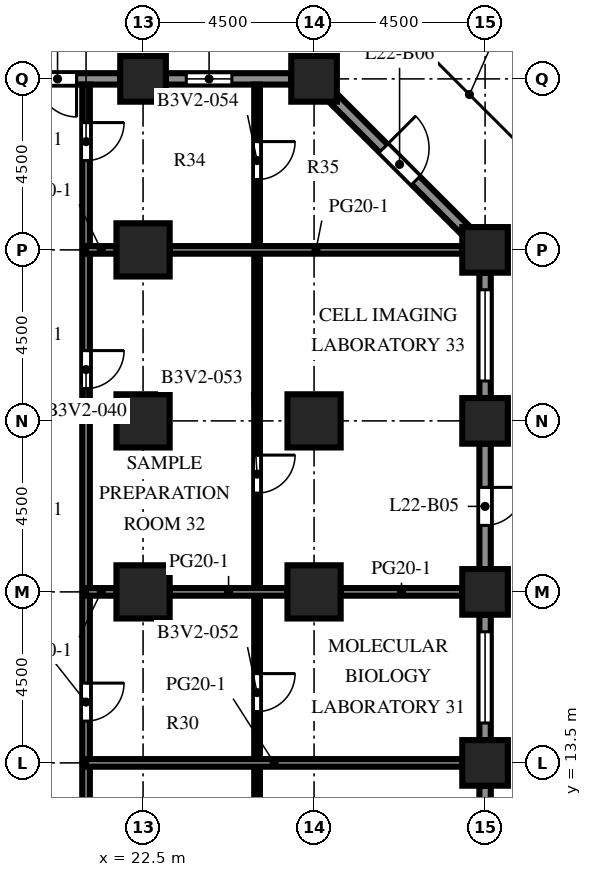
"""IFC4 building model, lengths in metres.
Left out: names, types, materials, properties, quantities, classifications, styles, units other than length and angle.
Written with IfcOpenShell. Run it as: python <this file> out.ifc"""

import sys

from ifc_helpers import new_model, si_unit, direction, frame, frame_2d, origin, origin_2d, place, context, subcontext, project, spatial, rectangle, extrude, element, fill, save


model = new_model("IFC4")
c1 = context("Model", 3, precision=1e-05, world=origin(), true_north=direction((0.0, 1.0)))
c2 = subcontext(c1, "Body", "Model", "MODEL_VIEW")
j1 = project(units=[si_unit("LENGTHUNIT", "METRE"), si_unit("PLANEANGLEUNIT", "RADIAN")], contexts=[c1])
p1 = place(None, origin())
s1 = spatial("IfcSite", under=j1, at=p1, CompositionType="ELEMENT")
p2 = place(p1, origin())
s2 = spatial("IfcBuilding", under=s1, at=p2, CompositionType="ELEMENT")
p3 = place(p2, frame((0.0, 0.0, 98.4)))
s3 = spatial("IfcBuildingStorey", under=s2, at=p3, CompositionType="ELEMENT", Elevation=98.4)
for number, where, z_axis, x_axis in (
    (1, (22.5, 31.5, 0.0), (0.0, 0.0, 1.0), (1.0, 0.0, 0.0)),
    (2, (27.0, 31.5, 0.0), (0.0, 0.0, 1.0), (1.0, 0.0, 0.0)),
    (3, (31.5, 13.5, 0.0), (0.0, 0.0, 1.0), (1.0, 0.0, 0.0)),
    (4, (31.5, 18.0, 0.0), (0.0, 0.0, 1.0), (1.0, 0.0, 0.0)),
    (5, (31.5, 22.5, 0.0), (0.0, 0.0, 1.0), (1.0, 0.0, 0.0)),
    (6, (31.5, 27.0, 0.0), (0.0, 0.0, 1.0), (1.0, 0.0, 0.0)),
):
    element("IfcColumn", number, at=place(p3, frame(where, z_axis=z_axis, x_axis=x_axis)), inside=s3, PredefinedType="COLUMN", context=c2, shape_type="SweptSolid", body=[
        extrude(rectangle(XDim=1.2, YDim=1.2, at=origin_2d()), origin(), (0.0, 0.0, 1.0), 4.1),
    ])
for number, where, z_axis, x_axis in (
    (7, (22.5, 18.0, 0.0), (0.0, 0.0, 1.0), (1.0, 0.0, 0.0)),
    (8, (22.5, 22.5, 0.0), (0.0, 0.0, 1.0), (1.0, 0.0, 0.0)),
    (9, (22.5, 27.0, 0.0), (0.0, 0.0, 1.0), (1.0, 0.0, 0.0)),
    (10, (27.0, 18.0, 0.0), (0.0, 0.0, 1.0), (1.0, 0.0, 0.0)),
    (11, (27.0, 22.5, 0.0), (0.0, 0.0, 1.0), (1.0, 0.0, 0.0)),
):
    element("IfcColumn", number, at=place(p3, frame(where, z_axis=z_axis, x_axis=x_axis)), inside=s3, PredefinedType="COLUMN", context=c2, shape_type="SweptSolid", body=[
        extrude(rectangle(XDim=1.4, YDim=1.4, at=origin_2d()), origin(), (0.0, 0.0, 1.0), 4.1),
    ])
p4 = place(p3, frame((31.5, 12.9, 0.0), z_axis=(0.0, 0.0, 1.0), x_axis=(0.0, -1.0, 0.0)))
e12 = element("IfcWall", 12, at=p4, inside=s3, PredefinedType="SOLIDWALL", context=c2, shape_type="SweptSolid", body=[
    extrude(rectangle(XDim=3.3, YDim=0.3, at=frame_2d((1.65, 0.0))), origin(), (0.0, 0.0, 1.0), 2.75),
])
p5 = place(p4, frame((0.45, 0.0, 0.8)))
e13 = element("IfcOpeningElement", 13, at=p5, cuts=e12, PredefinedType="OPENING", context=c2, shape_type="SweptSolid", body=[
    extrude(rectangle(XDim=2.4, YDim=1.7, at=frame_2d((1.2, 0.85))), frame((0.0, 0.16, 0.0), z_axis=(0.0, -1.0, 0.0), x_axis=(1.0, 0.0, 0.0)), (0.0, 0.0, 1.0), 0.32),
])
p6 = place(p3, frame((31.5, 17.4, 0.0), z_axis=(0.0, 0.0, 1.0), x_axis=(0.0, -1.0, 0.0)))
e14 = element("IfcWall", 14, at=p6, inside=s3, PredefinedType="SOLIDWALL", context=c2, shape_type="SweptSolid", body=[
    extrude(rectangle(XDim=3.3, YDim=0.3, at=frame_2d((1.65, 0.0))), origin(), (0.0, 0.0, 1.0), 2.75),
])
p7 = place(p6, frame((0.45, 0.0, 0.8)))
e15 = element("IfcOpeningElement", 15, at=p7, cuts=e14, PredefinedType="OPENING", context=c2, shape_type="SweptSolid", body=[
    extrude(rectangle(XDim=2.4, YDim=1.7, at=frame_2d((1.2, 0.85))), frame((0.0, 0.16, 0.0), z_axis=(0.0, -1.0, 0.0), x_axis=(1.0, 0.0, 0.0)), (0.0, 0.0, 1.0), 0.32),
])
p8 = place(p3, frame((31.5, 21.9, 0.0), z_axis=(0.0, 0.0, 1.0), x_axis=(0.0, -1.0, 0.0)))
e16 = element("IfcWall", 16, at=p8, inside=s3, PredefinedType="SOLIDWALL", context=c2, shape_type="SweptSolid", body=[
    extrude(rectangle(XDim=3.3, YDim=0.3, at=frame_2d((1.65, 0.0))), origin(), (0.0, 0.0, 1.0), 2.75),
])
p9 = place(p8, frame((1.15, 0.0, 0.0)))
e17 = element("IfcOpeningElement", 17, at=p9, cuts=e16, PredefinedType="OPENING", context=c2, shape_type="SweptSolid", body=[
    extrude(rectangle(XDim=1.0, YDim=2.2, at=frame_2d((0.5, 1.1))), frame((0.0, 0.16, 0.0), z_axis=(0.0, -1.0, 0.0), x_axis=(1.0, 0.0, 0.0)), (0.0, 0.0, 1.0), 0.32),
])
p10 = place(p3, frame((31.5, 26.4, 0.0), z_axis=(0.0, 0.0, 1.0), x_axis=(0.0, -1.0, 0.0)))
e18 = element("IfcWall", 18, at=p10, inside=s3, PredefinedType="SOLIDWALL", context=c2, shape_type="SweptSolid", body=[
    extrude(rectangle(XDim=3.3, YDim=0.3, at=frame_2d((1.65, 0.0))), origin(), (0.0, 0.0, 1.0), 2.75),
])
p11 = place(p10, frame((0.45, 0.0, 0.8)))
e19 = element("IfcOpeningElement", 19, at=p11, cuts=e18, PredefinedType="OPENING", context=c2, shape_type="SweptSolid", body=[
    extrude(rectangle(XDim=2.4, YDim=1.7, at=frame_2d((1.2, 0.85))), frame((0.0, 0.16, 0.0), z_axis=(0.0, -1.0, 0.0), x_axis=(1.0, 0.0, 0.0)), (0.0, 0.0, 1.0), 0.32),
])
p12 = place(p3, frame((27.494, 31.006, 0.0), z_axis=(0.0, 0.0, 1.0), x_axis=(0.707106781187, -0.707106781187, 0.0)))
e20 = element("IfcWall", 20, at=p12, inside=s3, PredefinedType="SOLIDWALL", context=c2, shape_type="SweptSolid", body=[
    extrude(rectangle(XDim=4.967, YDim=0.3, at=frame_2d((2.483, 0.0))), origin(), (0.0, 0.0, 1.0), 2.75),
])
p13 = place(p12, frame((1.884, 0.0, 0.0)))
e21 = element("IfcOpeningElement", 21, at=p13, cuts=e20, PredefinedType="OPENING", context=c2, shape_type="SweptSolid", body=[
    extrude(rectangle(XDim=1.2, YDim=2.2, at=frame_2d((0.6, 1.1))), frame((0.0, 0.16, 0.0), z_axis=(0.0, -1.0, 0.0), x_axis=(1.0, 0.0, 0.0)), (0.0, 0.0, 1.0), 0.32),
])
p14 = place(p3, frame((23.1, 31.5, 0.0), z_axis=(0.0, 0.0, 1.0), x_axis=(1.0, 0.0, 0.0)))
e22 = element("IfcWall", 22, at=p14, inside=s3, PredefinedType="SOLIDWALL", context=c2, shape_type="SweptSolid", body=[
    extrude(rectangle(XDim=3.3, YDim=0.3, at=frame_2d((1.65, 0.0))), origin(), (0.0, 0.0, 1.0), 2.75),
])
p15 = place(p14, frame((0.538, 0.0, 0.8)))
e23 = element("IfcOpeningElement", 23, at=p15, cuts=e22, PredefinedType="OPENING", context=c2, shape_type="SweptSolid", body=[
    extrude(rectangle(XDim=1.2, YDim=1.7, at=frame_2d((0.6, 0.85))), frame((0.0, 0.16, 0.0), z_axis=(0.0, -1.0, 0.0), x_axis=(1.0, 0.0, 0.0)), (0.0, 0.0, 1.0), 0.32),
])
p16 = place(p3, frame((18.6, 31.5, 0.0), z_axis=(0.0, 0.0, 1.0), x_axis=(1.0, 0.0, 0.0)))
e24 = element("IfcWall", 24, at=p16, inside=s3, PredefinedType="SOLIDWALL", context=c2, shape_type="SweptSolid", body=[
    extrude(rectangle(XDim=3.3, YDim=0.3, at=frame_2d((1.65, 0.0))), origin(), (0.0, 0.0, 1.0), 2.75),
])
p17 = place(p16, frame((1.15, 0.0, 0.0)))
e25 = element("IfcOpeningElement", 25, at=p17, cuts=e24, PredefinedType="OPENING", context=c2, shape_type="SweptSolid", body=[
    extrude(rectangle(XDim=1.0, YDim=2.2, at=frame_2d((0.5, 1.1))), frame((0.0, 0.16, 0.0), z_axis=(0.0, -1.0, 0.0), x_axis=(1.0, 0.0, 0.0)), (0.0, 0.0, 1.0), 0.32),
])
p18 = place(p3, frame((21.0, 31.35, 0.0), z_axis=(0.0, 0.0, 1.0), x_axis=(0.0, -1.0, 0.0)))
e26 = element("IfcWall", 26, at=p18, inside=s3, PredefinedType="PARTITIONING", context=c2, shape_type="SweptSolid", body=[
    extrude(rectangle(XDim=53.7, YDim=0.2, at=frame_2d((26.85, 0.0))), origin(), (0.0, 0.0, 1.0), 3.65),
])
p19 = place(p18, frame((50.5, 0.0, 0.0)))
e27 = element("IfcOpeningElement", 27, at=p19, cuts=e26, PredefinedType="OPENING", context=c2, shape_type="SweptSolid", body=[
    extrude(rectangle(XDim=1.0, YDim=2.1, at=frame_2d((0.5, 1.05))), frame((0.0, 0.11, 0.0), z_axis=(0.0, -1.0, 0.0), x_axis=(1.0, 0.0, 0.0)), (0.0, 0.0, 1.0), 0.22),
])
p20 = place(p18, frame((46.5, 0.0, 0.0)))
e28 = element("IfcOpeningElement", 28, at=p20, cuts=e26, PredefinedType="OPENING", context=c2, shape_type="SweptSolid", body=[
    extrude(rectangle(XDim=1.0, YDim=2.1, at=frame_2d((0.5, 1.05))), frame((0.0, 0.11, 0.0), z_axis=(0.0, -1.0, 0.0), x_axis=(1.0, 0.0, 0.0)), (0.0, 0.0, 1.0), 0.22),
])
p21 = place(p18, frame((38.5, 0.0, 0.0)))
e29 = element("IfcOpeningElement", 29, at=p21, cuts=e26, PredefinedType="OPENING", context=c2, shape_type="SweptSolid", body=[
    extrude(rectangle(XDim=1.0, YDim=2.1, at=frame_2d((0.5, 1.05))), frame((0.0, 0.11, 0.0), z_axis=(0.0, -1.0, 0.0), x_axis=(1.0, 0.0, 0.0)), (0.0, 0.0, 1.0), 0.22),
])
p22 = place(p18, frame((33.0, 0.0, 0.0)))
e30 = element("IfcOpeningElement", 30, at=p22, cuts=e26, PredefinedType="OPENING", context=c2, shape_type="SweptSolid", body=[
    extrude(rectangle(XDim=1.0, YDim=2.1, at=frame_2d((0.5, 1.05))), frame((0.0, 0.11, 0.0), z_axis=(0.0, -1.0, 0.0), x_axis=(1.0, 0.0, 0.0)), (0.0, 0.0, 1.0), 0.22),
])
p23 = place(p18, frame((23.5, 0.0, 0.0)))
e31 = element("IfcOpeningElement", 31, at=p23, cuts=e26, PredefinedType="OPENING", context=c2, shape_type="SweptSolid", body=[
    extrude(rectangle(XDim=1.0, YDim=2.1, at=frame_2d((0.5, 1.05))), frame((0.0, 0.11, 0.0), z_axis=(0.0, -1.0, 0.0), x_axis=(1.0, 0.0, 0.0)), (0.0, 0.0, 1.0), 0.22),
])
p24 = place(p18, frame((15.75, 0.0, 0.0)))
e32 = element("IfcOpeningElement", 32, at=p24, cuts=e26, PredefinedType="OPENING", context=c2, shape_type="SweptSolid", body=[
    extrude(rectangle(XDim=1.0, YDim=2.1, at=frame_2d((0.5, 1.05))), frame((0.0, 0.11, 0.0), z_axis=(0.0, -1.0, 0.0), x_axis=(1.0, 0.0, 0.0)), (0.0, 0.0, 1.0), 0.22),
])
p25 = place(p18, frame((7.0, 0.0, 0.0)))
e33 = element("IfcOpeningElement", 33, at=p25, cuts=e26, PredefinedType="OPENING", context=c2, shape_type="SweptSolid", body=[
    extrude(rectangle(XDim=1.0, YDim=2.1, at=frame_2d((0.5, 1.05))), frame((0.0, 0.11, 0.0), z_axis=(0.0, -1.0, 0.0), x_axis=(1.0, 0.0, 0.0)), (0.0, 0.0, 1.0), 0.22),
])
p26 = place(p18, frame((1.0, 0.0, 0.0)))
e34 = element("IfcOpeningElement", 34, at=p26, cuts=e26, PredefinedType="OPENING", context=c2, shape_type="SweptSolid", body=[
    extrude(rectangle(XDim=1.0, YDim=2.1, at=frame_2d((0.5, 1.05))), frame((0.0, 0.11, 0.0), z_axis=(0.0, -1.0, 0.0), x_axis=(1.0, 0.0, 0.0)), (0.0, 0.0, 1.0), 0.22),
])
p27 = place(p3, frame((25.5, 31.35, 0.0), z_axis=(0.0, 0.0, 1.0), x_axis=(0.0, -1.0, 0.0)))
e35 = element("IfcWall", 35, at=p27, inside=s3, PredefinedType="PARTITIONING", context=c2, shape_type="SweptSolid", body=[
    extrude(rectangle(XDim=53.7, YDim=0.15, at=frame_2d((26.85, 0.0))), origin(), (0.0, 0.0, 1.0), 3.65),
])
p28 = place(p27, frame((50.5, 0.0, 0.0)))
e36 = element("IfcOpeningElement", 36, at=p28, cuts=e35, PredefinedType="OPENING", context=c2, shape_type="SweptSolid", body=[
    extrude(rectangle(XDim=1.0, YDim=2.1, at=frame_2d((0.5, 1.05))), frame((0.0, 0.085, 0.0), z_axis=(0.0, -1.0, 0.0), x_axis=(1.0, 0.0, 0.0)), (0.0, 0.0, 1.0), 0.17),
])
p29 = place(p27, frame((46.25, 0.0, 0.0)))
e37 = element("IfcOpeningElement", 37, at=p29, cuts=e35, PredefinedType="OPENING", context=c2, shape_type="SweptSolid", body=[
    extrude(rectangle(XDim=1.0, YDim=2.1, at=frame_2d((0.5, 1.05))), frame((0.0, 0.085, 0.0), z_axis=(0.0, -1.0, 0.0), x_axis=(1.0, 0.0, 0.0)), (0.0, 0.0, 1.0), 0.17),
])
p30 = place(p27, frame((38.5, 0.0, 0.0)))
e38 = element("IfcOpeningElement", 38, at=p30, cuts=e35, PredefinedType="OPENING", context=c2, shape_type="SweptSolid", body=[
    extrude(rectangle(XDim=1.0, YDim=2.1, at=frame_2d((0.5, 1.05))), frame((0.0, 0.085, 0.0), z_axis=(0.0, -1.0, 0.0), x_axis=(1.0, 0.0, 0.0)), (0.0, 0.0, 1.0), 0.17),
])
p31 = place(p27, frame((33.0, 0.0, 0.0)))
e39 = element("IfcOpeningElement", 39, at=p31, cuts=e35, PredefinedType="OPENING", context=c2, shape_type="SweptSolid", body=[
    extrude(rectangle(XDim=1.0, YDim=2.1, at=frame_2d((0.5, 1.05))), frame((0.0, 0.085, 0.0), z_axis=(0.0, -1.0, 0.0), x_axis=(1.0, 0.0, 0.0)), (0.0, 0.0, 1.0), 0.17),
])
p32 = place(p27, frame((24.75, 0.0, 0.0)))
e40 = element("IfcOpeningElement", 40, at=p32, cuts=e35, PredefinedType="OPENING", context=c2, shape_type="SweptSolid", body=[
    extrude(rectangle(XDim=1.0, YDim=2.1, at=frame_2d((0.5, 1.05))), frame((0.0, 0.085, 0.0), z_axis=(0.0, -1.0, 0.0), x_axis=(1.0, 0.0, 0.0)), (0.0, 0.0, 1.0), 0.17),
])
p33 = place(p27, frame((15.5, 0.0, 0.0)))
e41 = element("IfcOpeningElement", 41, at=p33, cuts=e35, PredefinedType="OPENING", context=c2, shape_type="SweptSolid", body=[
    extrude(rectangle(XDim=1.0, YDim=2.1, at=frame_2d((0.5, 1.05))), frame((0.0, 0.085, 0.0), z_axis=(0.0, -1.0, 0.0), x_axis=(1.0, 0.0, 0.0)), (0.0, 0.0, 1.0), 0.17),
])
p34 = place(p27, frame((9.75, 0.0, 0.0)))
e42 = element("IfcOpeningElement", 42, at=p34, cuts=e35, PredefinedType="OPENING", context=c2, shape_type="SweptSolid", body=[
    extrude(rectangle(XDim=1.0, YDim=2.1, at=frame_2d((0.5, 1.05))), frame((0.0, 0.085, 0.0), z_axis=(0.0, -1.0, 0.0), x_axis=(1.0, 0.0, 0.0)), (0.0, 0.0, 1.0), 0.17),
])
p35 = place(p27, frame((1.5, 0.0, 0.0)))
e43 = element("IfcOpeningElement", 43, at=p35, cuts=e35, PredefinedType="OPENING", context=c2, shape_type="SweptSolid", body=[
    extrude(rectangle(XDim=1.0, YDim=2.1, at=frame_2d((0.5, 1.05))), frame((0.0, 0.085, 0.0), z_axis=(0.0, -1.0, 0.0), x_axis=(1.0, 0.0, 0.0)), (0.0, 0.0, 1.0), 0.17),
])
p36 = place(p3, frame((21.0, 13.5, 0.0), z_axis=(0.0, 0.0, 1.0), x_axis=(1.0, 0.0, 0.0)))
e44 = element("IfcWall", 44, at=p36, inside=s3, PredefinedType="PARTITIONING", context=c2, shape_type="SweptSolid", body=[
    extrude(rectangle(XDim=9.9, YDim=0.2, at=frame_2d((4.95, 0.0))), origin(), (0.0, 0.0, 1.0), 3.65),
])
p37 = place(p3, frame((21.0, 18.0, 0.0), z_axis=(0.0, 0.0, 1.0), x_axis=(1.0, 0.0, 0.0)))
e45 = element("IfcWall", 45, at=p37, inside=s3, PredefinedType="PARTITIONING", context=c2, shape_type="SweptSolid", body=[
    extrude(rectangle(XDim=0.8, YDim=0.2, at=frame_2d((0.4, 0.0))), origin(), (0.0, 0.0, 1.0), 3.65),
])
p38 = place(p3, frame((23.2, 18.0, 0.0), z_axis=(0.0, 0.0, 1.0), x_axis=(1.0, 0.0, 0.0)))
e46 = element("IfcWall", 46, at=p38, inside=s3, PredefinedType="PARTITIONING", context=c2, shape_type="SweptSolid", body=[
    extrude(rectangle(XDim=3.1, YDim=0.2, at=frame_2d((1.55, 0.0))), origin(), (0.0, 0.0, 1.0), 3.65),
])
p39 = place(p3, frame((27.7, 18.0, 0.0), z_axis=(0.0, 0.0, 1.0), x_axis=(1.0, 0.0, 0.0)))
e47 = element("IfcWall", 47, at=p39, inside=s3, PredefinedType="PARTITIONING", context=c2, shape_type="SweptSolid", body=[
    extrude(rectangle(XDim=3.2, YDim=0.2, at=frame_2d((1.6, 0.0))), origin(), (0.0, 0.0, 1.0), 3.65),
])
p40 = place(p3, frame((21.0, 27.0, 0.0), z_axis=(0.0, 0.0, 1.0), x_axis=(1.0, 0.0, 0.0)))
e48 = element("IfcWall", 48, at=p40, inside=s3, PredefinedType="PARTITIONING", context=c2, shape_type="SweptSolid", body=[
    extrude(rectangle(XDim=0.8, YDim=0.2, at=frame_2d((0.4, 0.0))), origin(), (0.0, 0.0, 1.0), 3.65),
])
p41 = place(p3, frame((23.2, 27.0, 0.0), z_axis=(0.0, 0.0, 1.0), x_axis=(1.0, 0.0, 0.0)))
e49 = element("IfcWall", 49, at=p41, inside=s3, PredefinedType="PARTITIONING", context=c2, shape_type="SweptSolid", body=[
    extrude(rectangle(XDim=7.7, YDim=0.2, at=frame_2d((3.85, 0.0))), origin(), (0.0, 0.0, 1.0), 3.65),
])
p42 = place(p7, origin())
e50 = element("IfcWindow", 50, at=p42, inside=s3, PartitioningType="SINGLE_PANEL", PredefinedType="WINDOW", context=c2, shape_type="SweptSolid", body=[
    extrude(rectangle(XDim=2.4, YDim=1.7, at=frame_2d((1.2, 0.85))), frame((0.0, 0.03, 0.0), z_axis=(0.0, -1.0, 0.0), x_axis=(1.0, 0.0, 0.0)), (0.0, 0.0, 1.0), 0.06),
])
fill(e15, e50)
p43 = place(p9, origin())
e51 = element("IfcDoor", 51, at=p43, inside=s3, OperationType="SINGLE_SWING_LEFT", PredefinedType="DOOR", context=c2, shape_type="SweptSolid", body=[
    extrude(rectangle(XDim=1.0, YDim=2.2, at=frame_2d((0.5, 1.1))), frame((0.0, 0.025, 0.0), z_axis=(0.0, -1.0, 0.0), x_axis=(1.0, 0.0, 0.0)), (0.0, 0.0, 1.0), 0.05),
])
fill(e17, e51)
p44 = place(p11, origin())
e52 = element("IfcWindow", 52, at=p44, inside=s3, PartitioningType="SINGLE_PANEL", PredefinedType="WINDOW", context=c2, shape_type="SweptSolid", body=[
    extrude(rectangle(XDim=2.4, YDim=1.7, at=frame_2d((1.2, 0.85))), frame((0.0, 0.03, 0.0), z_axis=(0.0, -1.0, 0.0), x_axis=(1.0, 0.0, 0.0)), (0.0, 0.0, 1.0), 0.06),
])
fill(e19, e52)
p45 = place(p13, origin())
e53 = element("IfcDoor", 53, at=p45, inside=s3, OperationType="SINGLE_SWING_LEFT", PredefinedType="DOOR", context=c2, shape_type="SweptSolid", body=[
    extrude(rectangle(XDim=1.2, YDim=2.2, at=frame_2d((0.6, 1.1))), frame((0.0, 0.025, 0.0), z_axis=(0.0, -1.0, 0.0), x_axis=(1.0, 0.0, 0.0)), (0.0, 0.0, 1.0), 0.05),
])
fill(e21, e53)
p46 = place(p15, origin())
e54 = element("IfcWindow", 54, at=p46, inside=s3, PartitioningType="SINGLE_PANEL", PredefinedType="WINDOW", context=c2, shape_type="SweptSolid", body=[
    extrude(rectangle(XDim=1.2, YDim=1.7, at=frame_2d((0.6, 0.85))), frame((0.0, 0.03, 0.0), z_axis=(0.0, -1.0, 0.0), x_axis=(1.0, 0.0, 0.0)), (0.0, 0.0, 1.0), 0.06),
])
fill(e23, e54)
p47 = place(p17, origin())
e55 = element("IfcDoor", 55, at=p47, inside=s3, OperationType="SINGLE_SWING_RIGHT", PredefinedType="DOOR", context=c2, shape_type="SweptSolid", body=[
    extrude(rectangle(XDim=1.0, YDim=2.2, at=frame_2d((0.5, 1.1))), frame((0.0, 0.025, 0.0), z_axis=(0.0, -1.0, 0.0), x_axis=(1.0, 0.0, 0.0)), (0.0, 0.0, 1.0), 0.05),
])
fill(e25, e55)
p48 = place(p24, origin())
e56 = element("IfcDoor", 56, at=p48, inside=s3, OperationType="SINGLE_SWING_LEFT", PredefinedType="DOOR", context=c2, shape_type="SweptSolid", body=[
    extrude(rectangle(XDim=1.0, YDim=2.1, at=frame_2d((0.5, 1.05))), frame((0.0, 0.025, 0.0), z_axis=(0.0, -1.0, 0.0), x_axis=(1.0, 0.0, 0.0)), (0.0, 0.0, 1.0), 0.05),
])
fill(e32, e56)
p49 = place(p25, origin())
e57 = element("IfcDoor", 57, at=p49, inside=s3, OperationType="SINGLE_SWING_LEFT", PredefinedType="DOOR", context=c2, shape_type="SweptSolid", body=[
    extrude(rectangle(XDim=1.0, YDim=2.1, at=frame_2d((0.5, 1.05))), frame((0.0, 0.025, 0.0), z_axis=(0.0, -1.0, 0.0), x_axis=(1.0, 0.0, 0.0)), (0.0, 0.0, 1.0), 0.05),
])
fill(e33, e57)
p50 = place(p26, origin())
e58 = element("IfcDoor", 58, at=p50, inside=s3, OperationType="SINGLE_SWING_LEFT", PredefinedType="DOOR", context=c2, shape_type="SweptSolid", body=[
    extrude(rectangle(XDim=1.0, YDim=2.1, at=frame_2d((0.5, 1.05))), frame((0.0, 0.025, 0.0), z_axis=(0.0, -1.0, 0.0), x_axis=(1.0, 0.0, 0.0)), (0.0, 0.0, 1.0), 0.05),
])
fill(e34, e58)
p51 = place(p33, origin())
e59 = element("IfcDoor", 59, at=p51, inside=s3, OperationType="SINGLE_SWING_LEFT", PredefinedType="DOOR", context=c2, shape_type="SweptSolid", body=[
    extrude(rectangle(XDim=1.0, YDim=2.1, at=frame_2d((0.5, 1.05))), frame((0.0, 0.025, 0.0), z_axis=(0.0, -1.0, 0.0), x_axis=(1.0, 0.0, 0.0)), (0.0, 0.0, 1.0), 0.05),
])
fill(e41, e59)
p52 = place(p34, origin())
e60 = element("IfcDoor", 60, at=p52, inside=s3, OperationType="SINGLE_SWING_LEFT", PredefinedType="DOOR", context=c2, shape_type="SweptSolid", body=[
    extrude(rectangle(XDim=1.0, YDim=2.1, at=frame_2d((0.5, 1.05))), frame((0.0, 0.025, 0.0), z_axis=(0.0, -1.0, 0.0), x_axis=(1.0, 0.0, 0.0)), (0.0, 0.0, 1.0), 0.05),
])
fill(e42, e60)
p53 = place(p35, origin())
e61 = element("IfcDoor", 61, at=p53, inside=s3, OperationType="SINGLE_SWING_LEFT", PredefinedType="DOOR", context=c2, shape_type="SweptSolid", body=[
    extrude(rectangle(XDim=1.0, YDim=2.1, at=frame_2d((0.5, 1.05))), frame((0.0, 0.025, 0.0), z_axis=(0.0, -1.0, 0.0), x_axis=(1.0, 0.0, 0.0)), (0.0, 0.0, 1.0), 0.05),
])
fill(e43, e61)
save(model, sys.argv[1])
